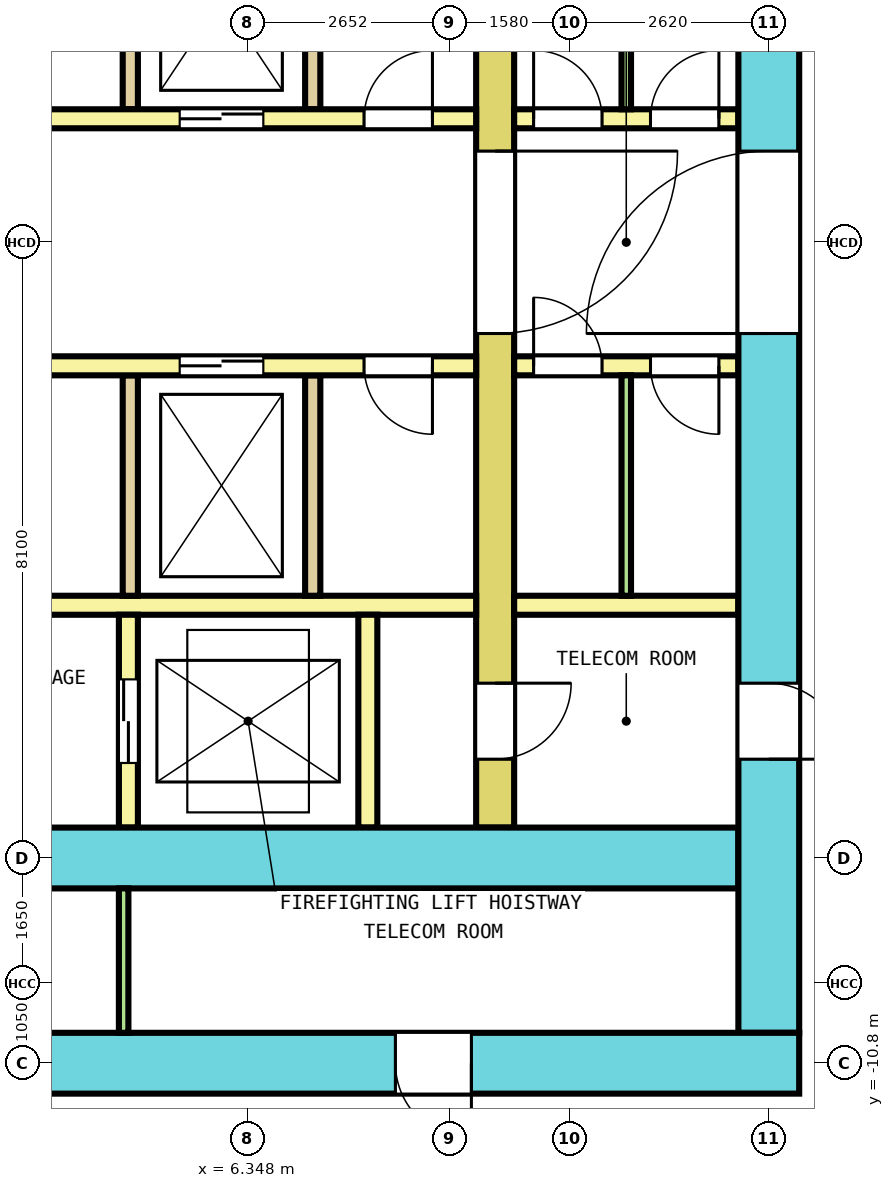
"""IFC4 building model, lengths in metres.
Left out: names, types, materials, properties, quantities, classifications, styles, units other than length and angle.
Written with IfcOpenShell. Run it as: python <this file> out.ifc"""

import sys

from ifc_helpers import new_model, si_unit, direction, frame, frame_2d, origin, place, context, subcontext, project, spatial, rectangle, extrude, element, fill, save


model = new_model("IFC4")
c1 = context("Model", 3, precision=1e-05, world=origin(), true_north=direction((0.0, 1.0)))
c2 = subcontext(c1, "Body", "Model", "MODEL_VIEW")
j1 = project(units=[si_unit("LENGTHUNIT", "METRE"), si_unit("PLANEANGLEUNIT", "RADIAN")], contexts=[c1])
p1 = place(None, origin())
s1 = spatial("IfcSite", under=j1, at=p1, CompositionType="ELEMENT")
p2 = place(p1, origin())
s2 = spatial("IfcBuilding", under=s1, at=p2, CompositionType="ELEMENT")
p3 = place(p2, frame((0.0, 0.0, 113.2)))
s3 = spatial("IfcBuildingStorey", under=s2, at=p3, CompositionType="ELEMENT", Elevation=113.2)
p4 = place(p3, frame((-13.6, -10.8, 0.0), z_axis=(0.0, 0.0, 1.0), x_axis=(1.0, 0.0, 0.0)))
e1 = element("IfcWall", 1, at=p4, inside=s3, PredefinedType="SHEAR", context=c2, shape_type="SweptSolid", body=[
    extrude(rectangle(XDim=27.2, YDim=0.8, at=frame_2d((13.6, 0.0))), origin(), (0.0, 0.0, 1.0), 4.1),
])
p5 = place(p4, frame((1.817, 0.0, 0.0)))
e2 = element("IfcOpeningElement", 2, at=p5, cuts=e1, PredefinedType="OPENING", context=c2, shape_type="SweptSolid", body=[
    extrude(rectangle(XDim=1.0, YDim=2.1, at=frame_2d((0.5, 1.05))), frame((0.0, 0.41, 0.0), z_axis=(0.0, -1.0, 0.0), x_axis=(1.0, 0.0, 0.0)), (0.0, 0.0, 1.0), 0.82),
])
p6 = place(p4, frame((4.945, 0.0, 0.0)))
e3 = element("IfcOpeningElement", 3, at=p6, cuts=e1, PredefinedType="OPENING", context=c2, shape_type="SweptSolid", body=[
    extrude(rectangle(XDim=1.0, YDim=2.1, at=frame_2d((0.5, 1.05))), frame((0.0, 0.41, 0.0), z_axis=(0.0, -1.0, 0.0), x_axis=(1.0, 0.0, 0.0)), (0.0, 0.0, 1.0), 0.82),
])
p7 = place(p4, frame((8.042, 0.0, 0.0)))
e4 = element("IfcOpeningElement", 4, at=p7, cuts=e1, PredefinedType="OPENING", context=c2, shape_type="SweptSolid", body=[
    extrude(rectangle(XDim=1.0, YDim=2.1, at=frame_2d((0.5, 1.05))), frame((0.0, 0.41, 0.0), z_axis=(0.0, -1.0, 0.0), x_axis=(1.0, 0.0, 0.0)), (0.0, 0.0, 1.0), 0.82),
])
p8 = place(p4, frame((11.139, 0.0, 0.0)))
e5 = element("IfcOpeningElement", 5, at=p8, cuts=e1, PredefinedType="OPENING", context=c2, shape_type="SweptSolid", body=[
    extrude(rectangle(XDim=1.0, YDim=2.1, at=frame_2d((0.5, 1.05))), frame((0.0, 0.41, 0.0), z_axis=(0.0, -1.0, 0.0), x_axis=(1.0, 0.0, 0.0)), (0.0, 0.0, 1.0), 0.82),
])
p9 = place(p4, frame((21.887, 0.0, 0.0)))
e6 = element("IfcOpeningElement", 6, at=p9, cuts=e1, PredefinedType="OPENING", context=c2, shape_type="SweptSolid", body=[
    extrude(rectangle(XDim=1.0, YDim=2.1, at=frame_2d((0.5, 1.05))), frame((0.0, 0.41, 0.0), z_axis=(0.0, -1.0, 0.0), x_axis=(1.0, 0.0, 0.0)), (0.0, 0.0, 1.0), 0.82),
])
p10 = place(p4, frame((15.15, 0.0, 0.0)))
e7 = element("IfcOpeningElement", 7, at=p10, cuts=e1, PredefinedType="OPENING", context=c2, shape_type="SweptSolid", body=[
    extrude(rectangle(XDim=1.2, YDim=2.1, at=frame_2d((0.6, 1.05))), frame((0.0, 0.41, 0.0), z_axis=(0.0, -1.0, 0.0), x_axis=(1.0, 0.0, 0.0)), (0.0, 0.0, 1.0), 0.82),
])
p11 = place(p3, frame((13.2, -10.4, 0.0), z_axis=(0.0, 0.0, 1.0), x_axis=(0.0, 1.0, 0.0)))
e8 = element("IfcWall", 8, at=p11, inside=s3, PredefinedType="SHEAR", context=c2, shape_type="SweptSolid", body=[
    extrude(rectangle(XDim=20.8, YDim=0.8, at=frame_2d((10.4, 0.0))), origin(), (0.0, 0.0, 1.0), 4.1),
])
p12 = place(p11, frame((9.2, 0.0, 0.0)))
e9 = element("IfcOpeningElement", 9, at=p12, cuts=e8, PredefinedType="OPENING", context=c2, shape_type="SweptSolid", body=[
    extrude(rectangle(XDim=2.4, YDim=2.1, at=frame_2d((1.2, 1.05))), frame((0.0, 0.41, 0.0), z_axis=(0.0, -1.0, 0.0), x_axis=(1.0, 0.0, 0.0)), (0.0, 0.0, 1.0), 0.82),
])
p13 = place(p11, frame((16.1, 0.0, 0.0)))
e10 = element("IfcOpeningElement", 10, at=p13, cuts=e8, PredefinedType="OPENING", context=c2, shape_type="SweptSolid", body=[
    extrude(rectangle(XDim=1.2, YDim=2.1, at=frame_2d((0.6, 1.05))), frame((0.0, 0.41, 0.0), z_axis=(0.0, -1.0, 0.0), x_axis=(1.0, 0.0, 0.0)), (0.0, 0.0, 1.0), 0.82),
])
p14 = place(p11, frame((3.6, 0.0, 0.0)))
e11 = element("IfcOpeningElement", 11, at=p14, cuts=e8, PredefinedType="OPENING", context=c2, shape_type="SweptSolid", body=[
    extrude(rectangle(XDim=1.0, YDim=2.1, at=frame_2d((0.5, 1.05))), frame((0.0, 0.41, 0.0), z_axis=(0.0, -1.0, 0.0), x_axis=(1.0, 0.0, 0.0)), (0.0, 0.0, 1.0), 0.82),
])
p15 = place(p3, frame((-12.8, -8.1, 0.0), z_axis=(0.0, 0.0, 1.0), x_axis=(1.0, 0.0, 0.0)))
e12 = element("IfcWall", 12, at=p15, inside=s3, PredefinedType="SHEAR", context=c2, shape_type="SweptSolid", body=[
    extrude(rectangle(XDim=25.6, YDim=0.8, at=frame_2d((12.8, 0.0))), origin(), (0.0, 0.0, 1.0), 4.1),
])
p16 = place(p15, frame((14.35, 0.0, 0.0)))
e13 = element("IfcOpeningElement", 13, at=p16, cuts=e12, PredefinedType="OPENING", context=c2, shape_type="SweptSolid", body=[
    extrude(rectangle(XDim=1.2, YDim=2.1, at=frame_2d((0.6, 1.05))), frame((0.0, 0.41, 0.0), z_axis=(0.0, -1.0, 0.0), x_axis=(1.0, 0.0, 0.0)), (0.0, 0.0, 1.0), 0.82),
])
p17 = place(p3, frame((9.6, -7.7, 0.0), z_axis=(0.0, 0.0, 1.0), x_axis=(0.0, 1.0, 0.0)))
e14 = element("IfcWall", 14, at=p17, inside=s3, PredefinedType="SHEAR", context=c2, shape_type="SweptSolid", body=[
    extrude(rectangle(XDim=15.4, YDim=0.5, at=frame_2d((7.7, 0.0))), origin(), (0.0, 0.0, 1.0), 4.1),
])
p18 = place(p17, frame((6.5, 0.0, 0.0)))
e15 = element("IfcOpeningElement", 15, at=p18, cuts=e14, PredefinedType="OPENING", context=c2, shape_type="SweptSolid", body=[
    extrude(rectangle(XDim=2.4, YDim=2.1, at=frame_2d((1.2, 1.05))), frame((0.0, 0.26, 0.0), z_axis=(0.0, -1.0, 0.0), x_axis=(1.0, 0.0, 0.0)), (0.0, 0.0, 1.0), 0.52),
])
p19 = place(p17, frame((13.4, 0.0, 0.0)))
e16 = element("IfcOpeningElement", 16, at=p19, cuts=e14, PredefinedType="OPENING", context=c2, shape_type="SweptSolid", body=[
    extrude(rectangle(XDim=1.2, YDim=2.1, at=frame_2d((0.6, 1.05))), frame((0.0, 0.26, 0.0), z_axis=(0.0, -1.0, 0.0), x_axis=(1.0, 0.0, 0.0)), (0.0, 0.0, 1.0), 0.52),
])
p20 = place(p17, frame((0.9, 0.0, 0.0)))
e17 = element("IfcOpeningElement", 17, at=p20, cuts=e14, PredefinedType="OPENING", context=c2, shape_type="SweptSolid", body=[
    extrude(rectangle(XDim=1.0, YDim=2.1, at=frame_2d((0.5, 1.05))), frame((0.0, 0.26, 0.0), z_axis=(0.0, -1.0, 0.0), x_axis=(1.0, 0.0, 0.0)), (0.0, 0.0, 1.0), 0.52),
])
p21 = place(p3, frame((-9.35, 1.625, 0.0), z_axis=(0.0, 0.0, 1.0), x_axis=(1.0, 0.0, 0.0)))
e18 = element("IfcWall", 18, at=p21, inside=s3, PredefinedType="SOLIDWALL", context=c2, shape_type="SweptSolid", body=[
    extrude(rectangle(XDim=18.7, YDim=0.25, at=frame_2d((9.35, 0.0))), origin(), (0.0, 0.0, 1.0), 4.1),
])
p22 = place(p21, frame((2.85, 0.0, 0.0)))
e19 = element("IfcOpeningElement", 19, at=p22, cuts=e18, PredefinedType="OPENING", context=c2, shape_type="SweptSolid", body=[
    extrude(rectangle(XDim=1.1, YDim=2.1, at=frame_2d((0.55, 1.05))), frame((0.0, 0.135, 0.0), z_axis=(0.0, -1.0, 0.0), x_axis=(1.0, 0.0, 0.0)), (0.0, 0.0, 1.0), 0.27),
])
p23 = place(p21, frame((5.15, 0.0, 0.0)))
e20 = element("IfcOpeningElement", 20, at=p23, cuts=e18, PredefinedType="OPENING", context=c2, shape_type="SweptSolid", body=[
    extrude(rectangle(XDim=1.1, YDim=2.1, at=frame_2d((0.55, 1.05))), frame((0.0, 0.135, 0.0), z_axis=(0.0, -1.0, 0.0), x_axis=(1.0, 0.0, 0.0)), (0.0, 0.0, 1.0), 0.27),
])
p24 = place(p21, frame((14.8, 0.0, 0.0)))
e21 = element("IfcOpeningElement", 21, at=p24, cuts=e18, PredefinedType="OPENING", context=c2, shape_type="SweptSolid", body=[
    extrude(rectangle(XDim=1.1, YDim=2.1, at=frame_2d((0.55, 1.05))), frame((0.0, 0.135, 0.0), z_axis=(0.0, -1.0, 0.0), x_axis=(1.0, 0.0, 0.0)), (0.0, 0.0, 1.0), 0.27),
])
p25 = place(p21, frame((0.575, 0.0, 0.0)))
e22 = element("IfcOpeningElement", 22, at=p25, cuts=e18, PredefinedType="OPENING", context=c2, shape_type="SweptSolid", body=[
    extrude(rectangle(XDim=0.9, YDim=2.1, at=frame_2d((0.45, 1.05))), frame((0.0, 0.135, 0.0), z_axis=(0.0, -1.0, 0.0), x_axis=(1.0, 0.0, 0.0)), (0.0, 0.0, 1.0), 0.27),
])
p26 = place(p21, frame((17.225, 0.0, 0.0)))
e23 = element("IfcOpeningElement", 23, at=p26, cuts=e18, PredefinedType="OPENING", context=c2, shape_type="SweptSolid", body=[
    extrude(rectangle(XDim=0.9, YDim=2.1, at=frame_2d((0.45, 1.05))), frame((0.0, 0.135, 0.0), z_axis=(0.0, -1.0, 0.0), x_axis=(1.0, 0.0, 0.0)), (0.0, 0.0, 1.0), 0.27),
])
p27 = place(p3, frame((9.85, 1.625, 0.0), z_axis=(0.0, 0.0, 1.0), x_axis=(1.0, 0.0, 0.0)))
e24 = element("IfcWall", 24, at=p27, inside=s3, PredefinedType="SOLIDWALL", context=c2, shape_type="SweptSolid", body=[
    extrude(rectangle(XDim=2.95, YDim=0.25, at=frame_2d((1.475, 0.0))), origin(), (0.0, 0.0, 1.0), 4.1),
])
p28 = place(p27, frame((0.256, 0.0, 0.0)))
e25 = element("IfcOpeningElement", 25, at=p28, cuts=e24, PredefinedType="OPENING", context=c2, shape_type="SweptSolid", body=[
    extrude(rectangle(XDim=0.9, YDim=2.1, at=frame_2d((0.45, 1.05))), frame((0.0, 0.135, 0.0), z_axis=(0.0, -1.0, 0.0), x_axis=(1.0, 0.0, 0.0)), (0.0, 0.0, 1.0), 0.27),
])
p29 = place(p27, frame((1.794, 0.0, 0.0)))
e26 = element("IfcOpeningElement", 26, at=p29, cuts=e24, PredefinedType="OPENING", context=c2, shape_type="SweptSolid", body=[
    extrude(rectangle(XDim=0.9, YDim=2.1, at=frame_2d((0.45, 1.05))), frame((0.0, 0.135, 0.0), z_axis=(0.0, -1.0, 0.0), x_axis=(1.0, 0.0, 0.0)), (0.0, 0.0, 1.0), 0.27),
])
for number, where, z_axis, x_axis in (
    (27, (4.8, 1.75, 0.0), (0.0, 0.0, 1.0), (0.0, 1.0, 0.0)),
    (28, (7.2, 1.75, 0.0), (0.0, 0.0, 1.0), (0.0, 1.0, 0.0)),
):
    element("IfcWall", number, at=place(p3, frame(where, z_axis=z_axis, x_axis=x_axis)), inside=s3, PredefinedType="SOLIDWALL", context=c2, shape_type="SweptSolid", body=[
        extrude(rectangle(XDim=2.9, YDim=0.2, at=frame_2d((1.45, 0.0))), origin(), (0.0, 0.0, 1.0), 4.1),
    ])
p30 = place(p3, frame((-9.35, -1.625, 0.0), z_axis=(0.0, 0.0, 1.0), x_axis=(1.0, 0.0, 0.0)))
e29 = element("IfcWall", 29, at=p30, inside=s3, PredefinedType="SOLIDWALL", context=c2, shape_type="SweptSolid", body=[
    extrude(rectangle(XDim=18.7, YDim=0.25, at=frame_2d((9.35, 0.0))), origin(), (0.0, 0.0, 1.0), 4.1),
])
p31 = place(p30, frame((2.85, 0.0, 0.0)))
e30 = element("IfcOpeningElement", 30, at=p31, cuts=e29, PredefinedType="OPENING", context=c2, shape_type="SweptSolid", body=[
    extrude(rectangle(XDim=1.1, YDim=2.1, at=frame_2d((0.55, 1.05))), frame((0.0, 0.135, 0.0), z_axis=(0.0, -1.0, 0.0), x_axis=(1.0, 0.0, 0.0)), (0.0, 0.0, 1.0), 0.27),
])
p32 = place(p30, frame((5.15, 0.0, 0.0)))
e31 = element("IfcOpeningElement", 31, at=p32, cuts=e29, PredefinedType="OPENING", context=c2, shape_type="SweptSolid", body=[
    extrude(rectangle(XDim=1.1, YDim=2.1, at=frame_2d((0.55, 1.05))), frame((0.0, 0.135, 0.0), z_axis=(0.0, -1.0, 0.0), x_axis=(1.0, 0.0, 0.0)), (0.0, 0.0, 1.0), 0.27),
])
p33 = place(p30, frame((14.8, 0.0, 0.0)))
e32 = element("IfcOpeningElement", 32, at=p33, cuts=e29, PredefinedType="OPENING", context=c2, shape_type="SweptSolid", body=[
    extrude(rectangle(XDim=1.1, YDim=2.1, at=frame_2d((0.55, 1.05))), frame((0.0, 0.135, 0.0), z_axis=(0.0, -1.0, 0.0), x_axis=(1.0, 0.0, 0.0)), (0.0, 0.0, 1.0), 0.27),
])
p34 = place(p30, frame((0.575, 0.0, 0.0)))
e33 = element("IfcOpeningElement", 33, at=p34, cuts=e29, PredefinedType="OPENING", context=c2, shape_type="SweptSolid", body=[
    extrude(rectangle(XDim=0.9, YDim=2.1, at=frame_2d((0.45, 1.05))), frame((0.0, 0.135, 0.0), z_axis=(0.0, -1.0, 0.0), x_axis=(1.0, 0.0, 0.0)), (0.0, 0.0, 1.0), 0.27),
])
p35 = place(p30, frame((17.225, 0.0, 0.0)))
e34 = element("IfcOpeningElement", 34, at=p35, cuts=e29, PredefinedType="OPENING", context=c2, shape_type="SweptSolid", body=[
    extrude(rectangle(XDim=0.9, YDim=2.1, at=frame_2d((0.45, 1.05))), frame((0.0, 0.135, 0.0), z_axis=(0.0, -1.0, 0.0), x_axis=(1.0, 0.0, 0.0)), (0.0, 0.0, 1.0), 0.27),
])
p36 = place(p3, frame((9.85, -1.625, 0.0), z_axis=(0.0, 0.0, 1.0), x_axis=(1.0, 0.0, 0.0)))
e35 = element("IfcWall", 35, at=p36, inside=s3, PredefinedType="SOLIDWALL", context=c2, shape_type="SweptSolid", body=[
    extrude(rectangle(XDim=2.95, YDim=0.25, at=frame_2d((1.475, 0.0))), origin(), (0.0, 0.0, 1.0), 4.1),
])
p37 = place(p36, frame((0.256, 0.0, 0.0)))
e36 = element("IfcOpeningElement", 36, at=p37, cuts=e35, PredefinedType="OPENING", context=c2, shape_type="SweptSolid", body=[
    extrude(rectangle(XDim=0.9, YDim=2.1, at=frame_2d((0.45, 1.05))), frame((0.0, 0.135, 0.0), z_axis=(0.0, -1.0, 0.0), x_axis=(1.0, 0.0, 0.0)), (0.0, 0.0, 1.0), 0.27),
])
p38 = place(p36, frame((1.794, 0.0, 0.0)))
e37 = element("IfcOpeningElement", 37, at=p38, cuts=e35, PredefinedType="OPENING", context=c2, shape_type="SweptSolid", body=[
    extrude(rectangle(XDim=0.9, YDim=2.1, at=frame_2d((0.45, 1.05))), frame((0.0, 0.135, 0.0), z_axis=(0.0, -1.0, 0.0), x_axis=(1.0, 0.0, 0.0)), (0.0, 0.0, 1.0), 0.27),
])
p39 = place(p3, frame((-9.35, -4.775, 0.0), z_axis=(0.0, 0.0, 1.0), x_axis=(1.0, 0.0, 0.0)))
e38 = element("IfcWall", 38, at=p39, inside=s3, PredefinedType="SOLIDWALL", context=c2, shape_type="SweptSolid", body=[
    extrude(rectangle(XDim=18.7, YDim=0.25, at=frame_2d((9.35, 0.0))), origin(), (0.0, 0.0, 1.0), 4.1),
])
p40 = place(p3, frame((9.85, -4.775, 0.0), z_axis=(0.0, 0.0, 1.0), x_axis=(1.0, 0.0, 0.0)))
e39 = element("IfcWall", 39, at=p40, inside=s3, PredefinedType="SOLIDWALL", context=c2, shape_type="SweptSolid", body=[
    extrude(rectangle(XDim=2.95, YDim=0.25, at=frame_2d((1.475, 0.0))), origin(), (0.0, 0.0, 1.0), 4.1),
])
for number, where, z_axis, x_axis in (
    (40, (4.8, -4.65, 0.0), (0.0, 0.0, 1.0), (0.0, 1.0, 0.0)),
    (41, (7.2, -4.65, 0.0), (0.0, 0.0, 1.0), (0.0, 1.0, 0.0)),
):
    element("IfcWall", number, at=place(p3, frame(where, z_axis=z_axis, x_axis=x_axis)), inside=s3, PredefinedType="SOLIDWALL", context=c2, shape_type="SweptSolid", body=[
        extrude(rectangle(XDim=2.9, YDim=0.2, at=frame_2d((1.45, 0.0))), origin(), (0.0, 0.0, 1.0), 4.1),
    ])
p41 = place(p3, frame((4.775, -7.7, 0.0), z_axis=(0.0, 0.0, 1.0), x_axis=(0.0, 1.0, 0.0)))
e42 = element("IfcWall", 42, at=p41, inside=s3, PredefinedType="SOLIDWALL", context=c2, shape_type="SweptSolid", body=[
    extrude(rectangle(XDim=2.8, YDim=0.25, at=frame_2d((1.4, 0.0))), origin(), (0.0, 0.0, 1.0), 4.1),
])
p42 = place(p41, frame((0.85, 0.0, 0.0)))
e43 = element("IfcOpeningElement", 43, at=p42, cuts=e42, PredefinedType="OPENING", context=c2, shape_type="SweptSolid", body=[
    extrude(rectangle(XDim=1.1, YDim=2.1, at=frame_2d((0.55, 1.05))), frame((0.0, 0.135, 0.0), z_axis=(0.0, -1.0, 0.0), x_axis=(1.0, 0.0, 0.0)), (0.0, 0.0, 1.0), 0.27),
])
p43 = place(p3, frame((7.925, -7.7, 0.0), z_axis=(0.0, 0.0, 1.0), x_axis=(0.0, 1.0, 0.0)))
e44 = element("IfcWall", 44, at=p43, inside=s3, PredefinedType="SOLIDWALL", context=c2, shape_type="SweptSolid", body=[
    extrude(rectangle(XDim=2.8, YDim=0.25, at=frame_2d((1.4, 0.0))), origin(), (0.0, 0.0, 1.0), 4.1),
])
p44 = place(p3, frame((4.712, -10.4, 0.0), z_axis=(0.0, 0.0, 1.0), x_axis=(0.0, 1.0, 0.0)))
e45 = element("IfcWall", 45, at=p44, inside=s3, PredefinedType="PARTITIONING", context=c2, shape_type="SweptSolid", body=[
    extrude(rectangle(XDim=1.9, YDim=0.125, at=frame_2d((0.95, 0.0))), origin(), (0.0, 0.0, 1.0), 4.1),
])
for number, where, z_axis, x_axis in (
    (46, (11.325, 1.75, 0.0), (0.0, 0.0, 1.0), (0.0, 1.0, 0.0)),
    (47, (11.325, -4.65, 0.0), (0.0, 0.0, 1.0), (0.0, 1.0, 0.0)),
):
    element("IfcWall", number, at=place(p3, frame(where, z_axis=z_axis, x_axis=x_axis)), inside=s3, PredefinedType="PARTITIONING", context=c2, shape_type="SweptSolid", body=[
        extrude(rectangle(XDim=2.9, YDim=0.125, at=frame_2d((1.45, 0.0))), origin(), (0.0, 0.0, 1.0), 4.1),
    ])
p45 = place(p24, origin())
e48 = element("IfcDoor", 48, at=p45, inside=s3, OperationType="DOUBLE_DOOR_SLIDING", PredefinedType="DOOR", context=c2, shape_type="SweptSolid", body=[
    extrude(rectangle(XDim=1.1, YDim=2.1, at=frame_2d((0.55, 1.05))), frame((0.0, 0.075, 0.0), z_axis=(0.0, -1.0, 0.0), x_axis=(1.0, 0.0, 0.0)), (0.0, 0.0, 1.0), 0.15),
])
fill(e21, e48)
p46 = place(p33, origin())
e49 = element("IfcDoor", 49, at=p46, inside=s3, OperationType="DOUBLE_DOOR_SLIDING", PredefinedType="DOOR", context=c2, shape_type="SweptSolid", body=[
    extrude(rectangle(XDim=1.1, YDim=2.1, at=frame_2d((0.55, 1.05))), frame((0.0, 0.075, 0.0), z_axis=(0.0, -1.0, 0.0), x_axis=(1.0, 0.0, 0.0)), (0.0, 0.0, 1.0), 0.15),
])
fill(e32, e49)
p47 = place(p42, origin())
e50 = element("IfcDoor", 50, at=p47, inside=s3, OperationType="DOUBLE_DOOR_SLIDING", PredefinedType="DOOR", context=c2, shape_type="SweptSolid", body=[
    extrude(rectangle(XDim=1.1, YDim=2.1, at=frame_2d((0.55, 1.05))), frame((0.0, 0.075, 0.0), z_axis=(0.0, -1.0, 0.0), x_axis=(1.0, 0.0, 0.0)), (0.0, 0.0, 1.0), 0.15),
])
fill(e43, e50)
p48 = place(p18, origin())
e51 = element("IfcDoor", 51, at=p48, inside=s3, OperationType="DOUBLE_DOOR_SINGLE_SWING", PredefinedType="DOOR", context=c2, shape_type="SweptSolid", body=[
    extrude(rectangle(XDim=2.4, YDim=2.1, at=frame_2d((1.2, 1.05))), frame((0.0, 0.2, 0.0), z_axis=(0.0, -1.0, 0.0), x_axis=(1.0, 0.0, 0.0)), (0.0, 0.0, 1.0), 0.4),
])
fill(e15, e51)
p49 = place(p12, origin())
e52 = element("IfcDoor", 52, at=p49, inside=s3, OperationType="DOUBLE_DOOR_SINGLE_SWING", PredefinedType="DOOR", context=c2, shape_type="SweptSolid", body=[
    extrude(rectangle(XDim=2.4, YDim=2.1, at=frame_2d((1.2, 1.05))), frame((0.0, 0.3, 0.0), z_axis=(0.0, -1.0, 0.0), x_axis=(1.0, 0.0, 0.0)), (0.0, 0.0, 1.0), 0.6),
])
fill(e9, e52)
p50 = place(p20, origin())
e53 = element("IfcDoor", 53, at=p50, inside=s3, OperationType="SINGLE_SWING_RIGHT", PredefinedType="DOOR", context=c2, shape_type="SweptSolid", body=[
    extrude(rectangle(XDim=1.0, YDim=2.1, at=frame_2d((0.5, 1.05))), frame((0.0, 0.2, 0.0), z_axis=(0.0, -1.0, 0.0), x_axis=(1.0, 0.0, 0.0)), (0.0, 0.0, 1.0), 0.4),
])
fill(e17, e53)
p51 = place(p14, origin())
e54 = element("IfcDoor", 54, at=p51, inside=s3, OperationType="SINGLE_SWING_LEFT", PredefinedType="DOOR", context=c2, shape_type="SweptSolid", body=[
    extrude(rectangle(XDim=1.0, YDim=2.1, at=frame_2d((0.5, 1.05))), frame((0.0, 0.3, 0.0), z_axis=(0.0, -1.0, 0.0), x_axis=(1.0, 0.0, 0.0)), (0.0, 0.0, 1.0), 0.6),
])
fill(e11, e54)
p52 = place(p9, origin())
e55 = element("IfcDoor", 55, at=p52, inside=s3, OperationType="SINGLE_SWING_LEFT", PredefinedType="DOOR", context=c2, shape_type="SweptSolid", body=[
    extrude(rectangle(XDim=1.0, YDim=2.1, at=frame_2d((0.5, 1.05))), frame((0.0, 0.3, 0.0), z_axis=(0.0, -1.0, 0.0), x_axis=(1.0, 0.0, 0.0)), (0.0, 0.0, 1.0), 0.6),
])
fill(e6, e55)
p53 = place(p26, origin())
e56 = element("IfcDoor", 56, at=p53, inside=s3, OperationType="SINGLE_SWING_RIGHT", PredefinedType="DOOR", context=c2, shape_type="SweptSolid", body=[
    extrude(rectangle(XDim=0.9, YDim=2.1, at=frame_2d((0.45, 1.05))), frame((0.0, 0.075, 0.0), z_axis=(0.0, -1.0, 0.0), x_axis=(1.0, 0.0, 0.0)), (0.0, 0.0, 1.0), 0.15),
])
fill(e23, e56)
p54 = place(p28, origin())
e57 = element("IfcDoor", 57, at=p54, inside=s3, OperationType="SINGLE_SWING_LEFT", PredefinedType="DOOR", context=c2, shape_type="SweptSolid", body=[
    extrude(rectangle(XDim=0.9, YDim=2.1, at=frame_2d((0.45, 1.05))), frame((0.0, 0.075, 0.0), z_axis=(0.0, -1.0, 0.0), x_axis=(1.0, 0.0, 0.0)), (0.0, 0.0, 1.0), 0.15),
])
fill(e25, e57)
p55 = place(p29, origin())
e58 = element("IfcDoor", 58, at=p55, inside=s3, OperationType="SINGLE_SWING_RIGHT", PredefinedType="DOOR", context=c2, shape_type="SweptSolid", body=[
    extrude(rectangle(XDim=0.9, YDim=2.1, at=frame_2d((0.45, 1.05))), frame((0.0, 0.075, 0.0), z_axis=(0.0, -1.0, 0.0), x_axis=(1.0, 0.0, 0.0)), (0.0, 0.0, 1.0), 0.15),
])
fill(e26, e58)
p56 = place(p35, origin())
e59 = element("IfcDoor", 59, at=p56, inside=s3, OperationType="SINGLE_SWING_RIGHT", PredefinedType="DOOR", context=c2, shape_type="SweptSolid", body=[
    extrude(rectangle(XDim=0.9, YDim=2.1, at=frame_2d((0.45, 1.05))), frame((0.0, 0.075, 0.0), z_axis=(0.0, -1.0, 0.0), x_axis=(1.0, 0.0, 0.0)), (0.0, 0.0, 1.0), 0.15),
])
fill(e34, e59)
p57 = place(p37, origin())
e60 = element("IfcDoor", 60, at=p57, inside=s3, OperationType="SINGLE_SWING_LEFT", PredefinedType="DOOR", context=c2, shape_type="SweptSolid", body=[
    extrude(rectangle(XDim=0.9, YDim=2.1, at=frame_2d((0.45, 1.05))), frame((0.0, 0.075, 0.0), z_axis=(0.0, -1.0, 0.0), x_axis=(1.0, 0.0, 0.0)), (0.0, 0.0, 1.0), 0.15),
])
fill(e36, e60)
p58 = place(p38, origin())
e61 = element("IfcDoor", 61, at=p58, inside=s3, OperationType="SINGLE_SWING_RIGHT", PredefinedType="DOOR", context=c2, shape_type="SweptSolid", body=[
    extrude(rectangle(XDim=0.9, YDim=2.1, at=frame_2d((0.45, 1.05))), frame((0.0, 0.075, 0.0), z_axis=(0.0, -1.0, 0.0), x_axis=(1.0, 0.0, 0.0)), (0.0, 0.0, 1.0), 0.15),
])
fill(e37, e61)
save(model, sys.argv[1])
